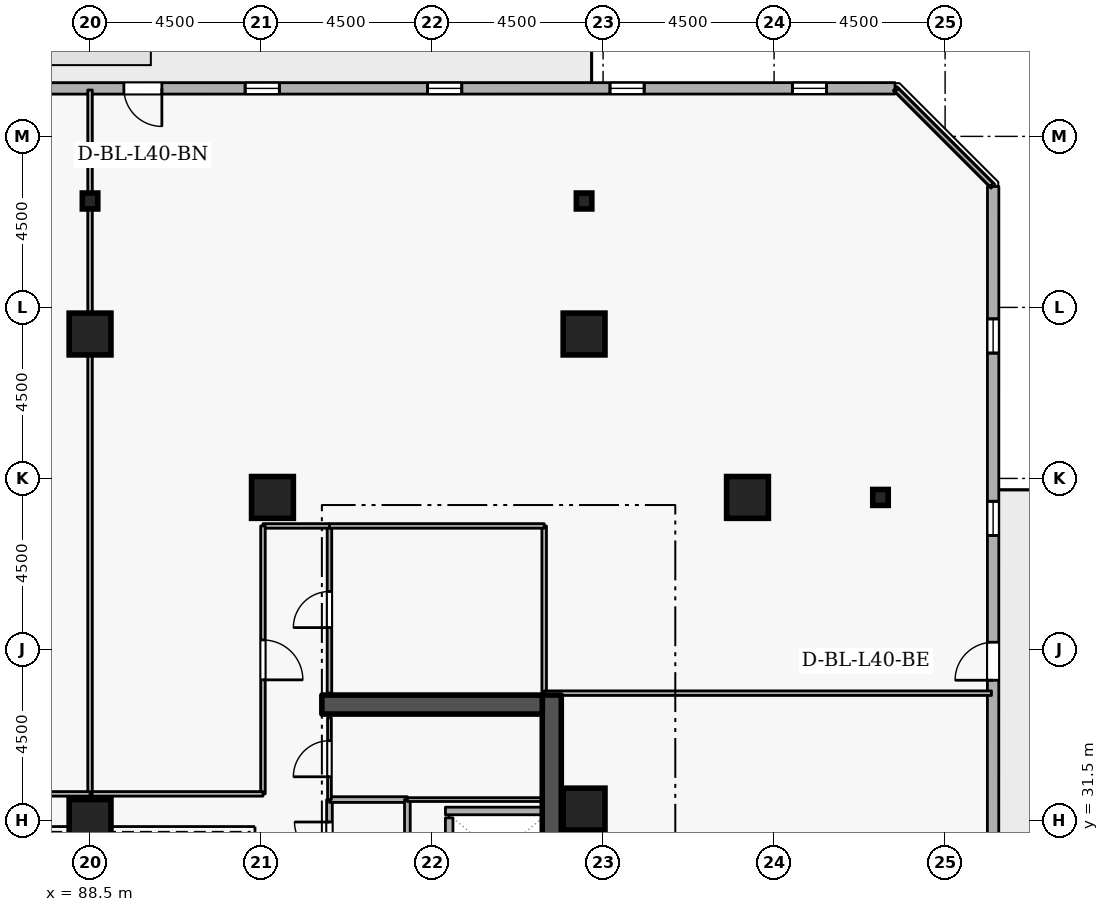
"""IFC4 building model, lengths in metres.
Left out: names, types, materials, properties, quantities, classifications, styles, units other than length and angle.
Written with IfcOpenShell. Run it as: python <this file> out.ifc"""

import sys

from ifc_helpers import new_model, si_unit, direction, frame, frame_2d, origin, origin_2d, place, context, subcontext, project, spatial, rectangle, i_section, extrude, element, fill, save


model = new_model("IFC4")
c1 = context("Model", 3, precision=1e-05, world=origin(), true_north=direction((0.0, 1.0)))
c2 = subcontext(c1, "Body", "Model", "MODEL_VIEW")
j1 = project(units=[si_unit("LENGTHUNIT", "METRE"), si_unit("PLANEANGLEUNIT", "RADIAN")], contexts=[c1])
p1 = place(None, origin())
s1 = spatial("IfcSite", under=j1, at=p1, CompositionType="ELEMENT")
p2 = place(p1, origin())
s2 = spatial("IfcBuilding", under=s1, at=p2, CompositionType="ELEMENT")
p3 = place(p2, frame((0.0, 0.0, 152.7)))
s3 = spatial("IfcBuildingStorey", under=s2, at=p3, CompositionType="ELEMENT", Elevation=152.7)
p4 = place(p3, frame((100.65, 19.2, 0.0), z_axis=(0.0, 0.0, 1.0), x_axis=(0.0, 1.0, 0.0)))
e1 = element("IfcWall", 1, at=p4, inside=s3, PredefinedType="SHEAR", context=c2, shape_type="SweptSolid", body=[
    extrude(rectangle(XDim=15.6, YDim=0.5, at=frame_2d((7.8, 0.0))), origin(), (0.0, 0.0, 1.0), 3.6),
])
p5 = place(p3, frame((94.6, 34.55, 0.0), z_axis=(0.0, 0.0, 1.0), x_axis=(1.0, 0.0, 0.0)))
e2 = element("IfcWall", 2, at=p5, inside=s3, PredefinedType="SHEAR", context=c2, shape_type="SweptSolid", body=[
    extrude(rectangle(XDim=5.8, YDim=0.5, at=frame_2d((2.9, 0.0))), origin(), (0.0, 0.0, 1.0), 3.6),
])
for number, where, z_axis, x_axis in (
    (3, (105.8, 40.0, 0.0), (0.0, 0.0, 1.0), (1.0, 0.0, 0.0)),
    (4, (101.5, 44.3, 0.0), (0.0, 0.0, 1.0), (1.0, 0.0, 0.0)),
    (5, (88.5, 44.3, 0.0), (0.0, 0.0, 1.0), (1.0, 0.0, 0.0)),
    (6, (93.3, 40.0, 0.0), (0.0, 0.0, 1.0), (1.0, 0.0, 0.0)),
    (7, (101.5, 31.8, 0.0), (0.0, 0.0, 1.0), (1.0, 0.0, 0.0)),
    (8, (88.5, 31.5, 0.0), (0.0, 0.0, 1.0), (1.0, 0.0, 0.0)),
):
    element("IfcColumn", number, at=place(p3, frame(where, z_axis=z_axis, x_axis=x_axis)), inside=s3, PredefinedType="COLUMN", context=c2, shape_type="SweptSolid", body=[
        extrude(rectangle(XDim=1.1, YDim=1.1, at=origin_2d()), origin(), (0.0, 0.0, 1.0), 3.6),
    ])
for number, where, z_axis, x_axis in (
    (9, (109.3, 40.0, 0.0), (0.0, 0.0, 1.0), (1.0, 0.0, 0.0)),
    (10, (101.5, 47.8, 0.0), (0.0, 0.0, 1.0), (1.0, 0.0, 0.0)),
    (11, (88.5, 47.8, 0.0), (0.0, 0.0, 1.0), (1.0, 0.0, 0.0)),
):
    element("IfcColumn", number, at=place(p3, frame(where, z_axis=z_axis, x_axis=x_axis)), inside=s3, PredefinedType="COLUMN", context=c2, shape_type="SweptSolid", body=[
        extrude(i_section(OverallWidth=0.407, OverallDepth=0.419, WebThickness=0.031, FlangeThickness=0.049, FilletRadius=0.015, at=origin_2d()), origin(), (0.0, 0.0, 1.0), 3.6),
    ])
p6 = place(p3, frame((112.26, 13.198, 0.0), z_axis=(0.0, 0.0, 1.0), x_axis=(0.000132597301, 0.999999991209, 0.0)))
e12 = element("IfcWall", 12, at=p6, inside=s3, PredefinedType="STANDARD", context=c2, shape_type="SweptSolid", body=[
    extrude(rectangle(XDim=34.983, YDim=0.3, at=frame_2d((17.492, 0.0))), origin(), (0.0, 0.0, 1.0), 2.7),
])
p7 = place(p6, frame((21.992, 0.0, 0.0)))
e13 = element("IfcOpeningElement", 13, at=p7, cuts=e12, PredefinedType="OPENING", context=c2, shape_type="SweptSolid", body=[
    extrude(rectangle(XDim=1.0, YDim=2.08, at=frame_2d((0.5, 1.04))), frame((0.0, 0.16, 0.0), z_axis=(0.0, -1.0, 0.0), x_axis=(1.0, 0.0, 0.0)), (0.0, 0.0, 1.0), 0.32),
])
p8 = place(p6, frame((1.8, 0.0, 0.72)))
e14 = element("IfcOpeningElement", 14, at=p8, cuts=e12, PredefinedType="OPENING", context=c2, shape_type="SweptSolid", body=[
    extrude(rectangle(XDim=0.9, YDim=1.75, at=frame_2d((0.45, 0.875))), frame((0.0, 0.16, 0.0), z_axis=(0.0, -1.0, 0.0), x_axis=(1.0, 0.0, 0.0)), (0.0, 0.0, 1.0), 0.32),
])
p9 = place(p6, frame((6.6, 0.0, 0.72)))
e15 = element("IfcOpeningElement", 15, at=p9, cuts=e12, PredefinedType="OPENING", context=c2, shape_type="SweptSolid", body=[
    extrude(rectangle(XDim=0.9, YDim=1.75, at=frame_2d((0.45, 0.875))), frame((0.0, 0.16, 0.0), z_axis=(0.0, -1.0, 0.0), x_axis=(1.0, 0.0, 0.0)), (0.0, 0.0, 1.0), 0.32),
])
p10 = place(p6, frame((11.4, 0.0, 0.72)))
e16 = element("IfcOpeningElement", 16, at=p10, cuts=e12, PredefinedType="OPENING", context=c2, shape_type="SweptSolid", body=[
    extrude(rectangle(XDim=0.9, YDim=1.75, at=frame_2d((0.45, 0.875))), frame((0.0, 0.16, 0.0), z_axis=(0.0, -1.0, 0.0), x_axis=(1.0, 0.0, 0.0)), (0.0, 0.0, 1.0), 0.32),
])
p11 = place(p6, frame((16.2, 0.0, 0.72)))
e17 = element("IfcOpeningElement", 17, at=p11, cuts=e12, PredefinedType="OPENING", context=c2, shape_type="SweptSolid", body=[
    extrude(rectangle(XDim=0.9, YDim=1.75, at=frame_2d((0.45, 0.875))), frame((0.0, 0.16, 0.0), z_axis=(0.0, -1.0, 0.0), x_axis=(1.0, 0.0, 0.0)), (0.0, 0.0, 1.0), 0.32),
])
p12 = place(p6, frame((25.8, 0.0, 0.72)))
e18 = element("IfcOpeningElement", 18, at=p12, cuts=e12, PredefinedType="OPENING", context=c2, shape_type="SweptSolid", body=[
    extrude(rectangle(XDim=0.9, YDim=1.75, at=frame_2d((0.45, 0.875))), frame((0.0, 0.16, 0.0), z_axis=(0.0, -1.0, 0.0), x_axis=(1.0, 0.0, 0.0)), (0.0, 0.0, 1.0), 0.32),
])
p13 = place(p6, frame((30.6, 0.0, 0.72)))
e19 = element("IfcOpeningElement", 19, at=p13, cuts=e12, PredefinedType="OPENING", context=c2, shape_type="SweptSolid", body=[
    extrude(rectangle(XDim=0.9, YDim=1.75, at=frame_2d((0.45, 0.875))), frame((0.0, 0.16, 0.0), z_axis=(0.0, -1.0, 0.0), x_axis=(1.0, 0.0, 0.0)), (0.0, 0.0, 1.0), 0.32),
])
p14 = place(p3, frame((109.681, 50.765, 0.0), z_axis=(0.0, 0.0, 1.0), x_axis=(-0.999999991209, -0.000132597301, 0.0)))
e20 = element("IfcWall", 20, at=p14, inside=s3, PredefinedType="STANDARD", context=c2, shape_type="SweptSolid", body=[
    extrude(rectangle(XDim=34.983, YDim=0.3, at=frame_2d((17.492, 0.0))), origin(), (0.0, 0.0, 1.0), 2.7),
])
p15 = place(p14, frame((19.292, 0.0, 0.0)))
e21 = element("IfcOpeningElement", 21, at=p15, cuts=e20, PredefinedType="OPENING", context=c2, shape_type="SweptSolid", body=[
    extrude(rectangle(XDim=1.0, YDim=2.08, at=frame_2d((0.5, 1.04))), frame((0.0, 0.16, 0.0), z_axis=(0.0, -1.0, 0.0), x_axis=(1.0, 0.0, 0.0)), (0.0, 0.0, 1.0), 0.32),
])
p16 = place(p14, frame((1.8, 0.0, 0.72)))
e22 = element("IfcOpeningElement", 22, at=p16, cuts=e20, PredefinedType="OPENING", context=c2, shape_type="SweptSolid", body=[
    extrude(rectangle(XDim=0.9, YDim=1.75, at=frame_2d((0.45, 0.875))), frame((0.0, 0.16, 0.0), z_axis=(0.0, -1.0, 0.0), x_axis=(1.0, 0.0, 0.0)), (0.0, 0.0, 1.0), 0.32),
])
p17 = place(p14, frame((6.6, 0.0, 0.72)))
e23 = element("IfcOpeningElement", 23, at=p17, cuts=e20, PredefinedType="OPENING", context=c2, shape_type="SweptSolid", body=[
    extrude(rectangle(XDim=0.9, YDim=1.75, at=frame_2d((0.45, 0.875))), frame((0.0, 0.16, 0.0), z_axis=(0.0, -1.0, 0.0), x_axis=(1.0, 0.0, 0.0)), (0.0, 0.0, 1.0), 0.32),
])
p18 = place(p14, frame((11.4, 0.0, 0.72)))
e24 = element("IfcOpeningElement", 24, at=p18, cuts=e20, PredefinedType="OPENING", context=c2, shape_type="SweptSolid", body=[
    extrude(rectangle(XDim=0.9, YDim=1.75, at=frame_2d((0.45, 0.875))), frame((0.0, 0.16, 0.0), z_axis=(0.0, -1.0, 0.0), x_axis=(1.0, 0.0, 0.0)), (0.0, 0.0, 1.0), 0.32),
])
p19 = place(p14, frame((16.2, 0.0, 0.72)))
e25 = element("IfcOpeningElement", 25, at=p19, cuts=e20, PredefinedType="OPENING", context=c2, shape_type="SweptSolid", body=[
    extrude(rectangle(XDim=0.9, YDim=1.75, at=frame_2d((0.45, 0.875))), frame((0.0, 0.16, 0.0), z_axis=(0.0, -1.0, 0.0), x_axis=(1.0, 0.0, 0.0)), (0.0, 0.0, 1.0), 0.32),
])
p20 = place(p14, frame((25.8, 0.0, 0.72)))
e26 = element("IfcOpeningElement", 26, at=p20, cuts=e20, PredefinedType="OPENING", context=c2, shape_type="SweptSolid", body=[
    extrude(rectangle(XDim=0.9, YDim=1.75, at=frame_2d((0.45, 0.875))), frame((0.0, 0.16, 0.0), z_axis=(0.0, -1.0, 0.0), x_axis=(1.0, 0.0, 0.0)), (0.0, 0.0, 1.0), 0.32),
])
p21 = place(p14, frame((30.6, 0.0, 0.72)))
e27 = element("IfcOpeningElement", 27, at=p21, cuts=e20, PredefinedType="OPENING", context=c2, shape_type="SweptSolid", body=[
    extrude(rectangle(XDim=0.9, YDim=1.75, at=frame_2d((0.45, 0.875))), frame((0.0, 0.16, 0.0), z_axis=(0.0, -1.0, 0.0), x_axis=(1.0, 0.0, 0.0)), (0.0, 0.0, 1.0), 0.32),
])
p22 = place(p3, frame((97.95, 31.57, 0.0), z_axis=(0.0, 0.0, 1.0), x_axis=(0.0, -1.0, 0.0)))
e28 = element("IfcWall", 28, at=p22, inside=s3, PredefinedType="STANDARD", context=c2, shape_type="SweptSolid", body=[
    extrude(rectangle(XDim=1.99, YDim=0.2, at=frame_2d((0.995, 0.0))), origin(), (0.0, 0.0, 1.0), 3.34),
])
p23 = place(p3, frame((97.852, 31.75, 0.0), z_axis=(0.0, 0.0, 1.0), x_axis=(1.0, 0.0, 0.0)))
e29 = element("IfcWall", 29, at=p23, inside=s3, PredefinedType="STANDARD", context=c2, shape_type="SweptSolid", body=[
    extrude(rectangle(XDim=2.536, YDim=0.2, at=frame_2d((1.268, 0.0))), origin(), (0.0, 0.0, 1.0), 3.34),
])
p24 = place(p3, frame((94.8, 29.95, 0.0), z_axis=(0.0, 0.0, 1.0), x_axis=(0.0, 1.0, 0.0)))
e30 = element("IfcWall", 30, at=p24, inside=s3, PredefinedType="PARTITIONING", context=c2, shape_type="SweptSolid", body=[
    extrude(rectangle(XDim=2.1, YDim=0.15, at=frame_2d((1.05, 0.0))), origin(), (0.0, 0.0, 1.0), 3.34),
])
p25 = place(p24, frame((0.59, 0.0, 0.0)))
e31 = element("IfcOpeningElement", 31, at=p25, cuts=e30, PredefinedType="OPENING", context=c2, shape_type="SweptSolid", body=[
    extrude(rectangle(XDim=0.92, YDim=2.08, at=frame_2d((0.46, 1.04))), frame((0.0, 0.085, 0.0), z_axis=(0.0, -1.0, 0.0), x_axis=(1.0, 0.0, 0.0)), (0.0, 0.0, 1.0), 0.17),
])
p26 = place(p3, frame((94.8, 32.05, 0.0), z_axis=(0.0, 0.0, 1.0), x_axis=(1.0, 0.0, 0.0)))
e32 = element("IfcWall", 32, at=p26, inside=s3, PredefinedType="PARTITIONING", context=c2, shape_type="SweptSolid", body=[
    extrude(rectangle(XDim=2.05, YDim=0.15, at=frame_2d((1.025, 0.0))), origin(), (0.0, 0.0, 1.0), 3.34),
])
p27 = place(p3, frame((96.85, 32.05, 0.0), z_axis=(0.0, 0.0, 1.0), x_axis=(0.0, -1.0, 0.0)))
e33 = element("IfcWall", 33, at=p27, inside=s3, PredefinedType="PARTITIONING", context=c2, shape_type="SweptSolid", body=[
    extrude(rectangle(XDim=2.1, YDim=0.15, at=frame_2d((1.05, 0.0))), origin(), (0.0, 0.0, 1.0), 3.34),
])
p28 = place(p3, frame((94.8, 32.05, 0.0), z_axis=(0.0, 0.0, 1.0), x_axis=(0.0, 1.0, 0.0)))
e34 = element("IfcWall", 34, at=p28, inside=s3, PredefinedType="PARTITIONING", context=c2, shape_type="SweptSolid", body=[
    extrude(rectangle(XDim=2.15, YDim=0.1, at=frame_2d((1.075, 0.0))), origin(), (0.0, 0.0, 1.0), 3.34),
])
p29 = place(p28, frame((0.6, 0.0, 0.0)))
e35 = element("IfcOpeningElement", 35, at=p29, cuts=e34, PredefinedType="OPENING", context=c2, shape_type="SweptSolid", body=[
    extrude(rectangle(XDim=0.95, YDim=2.1, at=frame_2d((0.475, 1.05))), frame((0.0, 0.06, 0.0), z_axis=(0.0, -1.0, 0.0), x_axis=(1.0, 0.0, 0.0)), (0.0, 0.0, 1.0), 0.12),
])
p30 = place(p3, frame((100.4, 32.05, 0.0), z_axis=(0.0, 0.0, 1.0), x_axis=(-1.0, 0.0, 0.0)))
e36 = element("IfcWall", 36, at=p30, inside=s3, PredefinedType="PARTITIONING", context=c2, shape_type="SweptSolid", body=[
    extrude(rectangle(XDim=3.55, YDim=0.1, at=frame_2d((1.775, 0.0))), origin(), (0.0, 0.0, 1.0), 3.34),
])
p31 = place(p3, frame((100.45, 39.25, 0.0), z_axis=(0.0, 0.0, 1.0), x_axis=(0.0, -1.0, 0.0)))
e37 = element("IfcWall", 37, at=p31, inside=s3, PredefinedType="PARTITIONING", context=c2, shape_type="SweptSolid", body=[
    extrude(rectangle(XDim=4.4, YDim=0.12, at=frame_2d((2.2, 0.0))), origin(), (0.0, 0.0, 1.0), 3.34),
])
p32 = place(p3, frame((94.8, 34.85, 0.0), z_axis=(0.0, 0.0, 1.0), x_axis=(0.0, 1.0, 0.0)))
e38 = element("IfcWall", 38, at=p32, inside=s3, PredefinedType="PARTITIONING", context=c2, shape_type="SweptSolid", body=[
    extrude(rectangle(XDim=4.4, YDim=0.12, at=frame_2d((2.2, 0.0))), origin(), (0.0, 0.0, 1.0), 3.34),
])
p33 = place(p32, frame((1.725, 0.0, 0.0)))
e39 = element("IfcOpeningElement", 39, at=p33, cuts=e38, PredefinedType="OPENING", context=c2, shape_type="SweptSolid", body=[
    extrude(rectangle(XDim=0.95, YDim=2.1, at=frame_2d((0.475, 1.05))), frame((0.0, 0.07, 0.0), z_axis=(0.0, -1.0, 0.0), x_axis=(1.0, 0.0, 0.0)), (0.0, 0.0, 1.0), 0.14),
])
p34 = place(p3, frame((94.8, 39.25, 0.0), z_axis=(0.0, 0.0, 1.0), x_axis=(1.0, 0.0, 0.0)))
e40 = element("IfcWall", 40, at=p34, inside=s3, PredefinedType="PARTITIONING", context=c2, shape_type="SweptSolid", body=[
    extrude(rectangle(XDim=5.65, YDim=0.12, at=frame_2d((2.825, 0.0))), origin(), (0.0, 0.0, 1.0), 3.34),
])
p35 = place(p3, frame((94.8, 39.25, 0.0), z_axis=(0.0, 0.0, 1.0), x_axis=(-1.0, 0.0, 0.0)))
e41 = element("IfcWall", 41, at=p35, inside=s3, PredefinedType="PARTITIONING", context=c2, shape_type="SweptSolid", body=[
    extrude(rectangle(XDim=1.75, YDim=0.12, at=frame_2d((0.875, 0.0))), origin(), (0.0, 0.0, 1.0), 3.34),
])
p36 = place(p3, frame((93.05, 39.25, 0.0), z_axis=(0.0, 0.0, 1.0), x_axis=(0.0, -1.0, 0.0)))
e42 = element("IfcWall", 42, at=p36, inside=s3, PredefinedType="PARTITIONING", context=c2, shape_type="SweptSolid", body=[
    extrude(rectangle(XDim=7.05, YDim=0.12, at=frame_2d((3.525, 0.0))), origin(), (0.0, 0.0, 1.0), 3.34),
])
p37 = place(p36, frame((3.0, 0.0, 0.0)))
e43 = element("IfcOpeningElement", 43, at=p37, cuts=e42, PredefinedType="OPENING", context=c2, shape_type="SweptSolid", body=[
    extrude(rectangle(XDim=1.05, YDim=2.1, at=frame_2d((0.525, 1.05))), frame((0.0, 0.07, 0.0), z_axis=(0.0, -1.0, 0.0), x_axis=(1.0, 0.0, 0.0)), (0.0, 0.0, 1.0), 0.14),
])
p38 = place(p3, frame((93.05, 32.2, 0.0), z_axis=(0.0, 0.0, 1.0), x_axis=(-1.0, 0.0, 0.0)))
e44 = element("IfcWall", 44, at=p38, inside=s3, PredefinedType="PARTITIONING", context=c2, shape_type="SweptSolid", body=[
    extrude(rectangle(XDim=4.55, YDim=0.12, at=frame_2d((2.275, 0.0))), origin(), (0.0, 0.0, 1.0), 3.34),
])
p39 = place(p3, frame((88.5, 32.2, 0.0), z_axis=(0.0, 0.0, 1.0), x_axis=(0.0, 1.0, 0.0)))
e45 = element("IfcWall", 45, at=p39, inside=s3, PredefinedType="PARTITIONING", context=c2, shape_type="SweptSolid", body=[
    extrude(rectangle(XDim=18.52, YDim=0.12, at=frame_2d((9.26, 0.0))), origin(), (0.0, 0.0, 1.0), 2.932),
])
p40 = place(p3, frame((109.725, 50.72, 0.0), z_axis=(0.0, 0.0, 1.0), x_axis=(0.707106781187, -0.707106781187, 0.0)))
e46 = element("IfcWall", 46, at=p40, inside=s3, PredefinedType="PARTITIONING", context=c2, shape_type="SweptSolid", body=[
    extrude(rectangle(XDim=3.528, YDim=0.12, at=frame_2d((1.764, 0.0))), origin(), (0.0, 0.0, 1.0), 3.34),
])
p41 = place(p3, frame((112.22, 34.85, 0.0), z_axis=(0.0, 0.0, 1.0), x_axis=(-1.0, 0.0, 0.0)))
e47 = element("IfcWall", 47, at=p41, inside=s3, PredefinedType="PARTITIONING", context=c2, shape_type="SweptSolid", body=[
    extrude(rectangle(XDim=11.77, YDim=0.12, at=frame_2d((5.885, 0.0))), origin(), (0.0, 0.0, 1.0), 2.545),
])
p42 = place(p3, frame((88.5, 32.2, 0.0), z_axis=(0.0, 0.0, 1.0), x_axis=(-1.0, 0.0, 0.0)))
e48 = element("IfcWall", 48, at=p42, inside=s3, PredefinedType="PARTITIONING", context=c2, shape_type="SweptSolid", body=[
    extrude(rectangle(XDim=4.55, YDim=0.12, at=frame_2d((2.275, 0.0))), origin(), (0.0, 0.0, 1.0), 3.34),
])
p43 = place(p7, origin())
e49 = element("IfcDoor", 49, at=p43, inside=s3, OperationType="SINGLE_SWING_LEFT", PredefinedType="DOOR", context=c2, shape_type="SweptSolid", body=[
    extrude(rectangle(XDim=1.0, YDim=2.08, at=frame_2d((0.5, 1.04))), frame((0.0, 0.025, 0.0), z_axis=(0.0, -1.0, 0.0), x_axis=(1.0, 0.0, 0.0)), (0.0, 0.0, 1.0), 0.05),
])
fill(e13, e49)
p44 = place(p12, origin())
e50 = element("IfcWindow", 50, at=p44, inside=s3, PartitioningType="SINGLE_PANEL", PredefinedType="WINDOW", context=c2, shape_type="SweptSolid", body=[
    extrude(rectangle(XDim=0.9, YDim=1.75, at=frame_2d((0.45, 0.875))), frame((0.0, 0.03, 0.0), z_axis=(0.0, -1.0, 0.0), x_axis=(1.0, 0.0, 0.0)), (0.0, 0.0, 1.0), 0.06),
])
fill(e18, e50)
p45 = place(p13, origin())
e51 = element("IfcWindow", 51, at=p45, inside=s3, PartitioningType="SINGLE_PANEL", PredefinedType="WINDOW", context=c2, shape_type="SweptSolid", body=[
    extrude(rectangle(XDim=0.9, YDim=1.75, at=frame_2d((0.45, 0.875))), frame((0.0, 0.03, 0.0), z_axis=(0.0, -1.0, 0.0), x_axis=(1.0, 0.0, 0.0)), (0.0, 0.0, 1.0), 0.06),
])
fill(e19, e51)
p46 = place(p15, origin())
e52 = element("IfcDoor", 52, at=p46, inside=s3, OperationType="SINGLE_SWING_LEFT", PredefinedType="DOOR", context=c2, shape_type="SweptSolid", body=[
    extrude(rectangle(XDim=1.0, YDim=2.08, at=frame_2d((0.5, 1.04))), frame((0.0, 0.025, 0.0), z_axis=(0.0, -1.0, 0.0), x_axis=(1.0, 0.0, 0.0)), (0.0, 0.0, 1.0), 0.05),
])
fill(e21, e52)
p47 = place(p16, origin())
e53 = element("IfcWindow", 53, at=p47, inside=s3, PartitioningType="SINGLE_PANEL", PredefinedType="WINDOW", context=c2, shape_type="SweptSolid", body=[
    extrude(rectangle(XDim=0.9, YDim=1.75, at=frame_2d((0.45, 0.875))), frame((0.0, 0.03, 0.0), z_axis=(0.0, -1.0, 0.0), x_axis=(1.0, 0.0, 0.0)), (0.0, 0.0, 1.0), 0.06),
])
fill(e22, e53)
p48 = place(p17, origin())
e54 = element("IfcWindow", 54, at=p48, inside=s3, PartitioningType="SINGLE_PANEL", PredefinedType="WINDOW", context=c2, shape_type="SweptSolid", body=[
    extrude(rectangle(XDim=0.9, YDim=1.75, at=frame_2d((0.45, 0.875))), frame((0.0, 0.03, 0.0), z_axis=(0.0, -1.0, 0.0), x_axis=(1.0, 0.0, 0.0)), (0.0, 0.0, 1.0), 0.06),
])
fill(e23, e54)
p49 = place(p18, origin())
e55 = element("IfcWindow", 55, at=p49, inside=s3, PartitioningType="SINGLE_PANEL", PredefinedType="WINDOW", context=c2, shape_type="SweptSolid", body=[
    extrude(rectangle(XDim=0.9, YDim=1.75, at=frame_2d((0.45, 0.875))), frame((0.0, 0.03, 0.0), z_axis=(0.0, -1.0, 0.0), x_axis=(1.0, 0.0, 0.0)), (0.0, 0.0, 1.0), 0.06),
])
fill(e24, e55)
p50 = place(p19, origin())
e56 = element("IfcWindow", 56, at=p50, inside=s3, PartitioningType="SINGLE_PANEL", PredefinedType="WINDOW", context=c2, shape_type="SweptSolid", body=[
    extrude(rectangle(XDim=0.9, YDim=1.75, at=frame_2d((0.45, 0.875))), frame((0.0, 0.03, 0.0), z_axis=(0.0, -1.0, 0.0), x_axis=(1.0, 0.0, 0.0)), (0.0, 0.0, 1.0), 0.06),
])
fill(e25, e56)
p51 = place(p25, origin())
e57 = element("IfcDoor", 57, at=p51, inside=s3, OperationType="SINGLE_SWING_RIGHT", PredefinedType="DOOR", context=c2, shape_type="SweptSolid", body=[
    extrude(rectangle(XDim=0.92, YDim=2.08, at=frame_2d((0.46, 1.04))), frame((0.0, 0.025, 0.0), z_axis=(0.0, -1.0, 0.0), x_axis=(1.0, 0.0, 0.0)), (0.0, 0.0, 1.0), 0.05),
])
fill(e31, e57)
p52 = place(p29, origin())
e58 = element("IfcDoor", 58, at=p52, inside=s3, OperationType="SINGLE_SWING_LEFT", PredefinedType="DOOR", context=c2, shape_type="SweptSolid", body=[
    extrude(rectangle(XDim=0.95, YDim=2.1, at=frame_2d((0.475, 1.05))), frame((0.0, 0.025, 0.0), z_axis=(0.0, -1.0, 0.0), x_axis=(1.0, 0.0, 0.0)), (0.0, 0.0, 1.0), 0.05),
])
fill(e35, e58)
p53 = place(p33, origin())
e59 = element("IfcDoor", 59, at=p53, inside=s3, OperationType="SINGLE_SWING_LEFT", PredefinedType="DOOR", context=c2, shape_type="SweptSolid", body=[
    extrude(rectangle(XDim=0.95, YDim=2.1, at=frame_2d((0.475, 1.05))), frame((0.0, 0.025, 0.0), z_axis=(0.0, -1.0, 0.0), x_axis=(1.0, 0.0, 0.0)), (0.0, 0.0, 1.0), 0.05),
])
fill(e39, e59)
p54 = place(p37, origin())
e60 = element("IfcDoor", 60, at=p54, inside=s3, OperationType="SINGLE_SWING_RIGHT", PredefinedType="DOOR", context=c2, shape_type="SweptSolid", body=[
    extrude(rectangle(XDim=1.05, YDim=2.1, at=frame_2d((0.525, 1.05))), frame((0.0, 0.025, 0.0), z_axis=(0.0, -1.0, 0.0), x_axis=(1.0, 0.0, 0.0)), (0.0, 0.0, 1.0), 0.05),
])
fill(e43, e60)
save(model, sys.argv[1])
